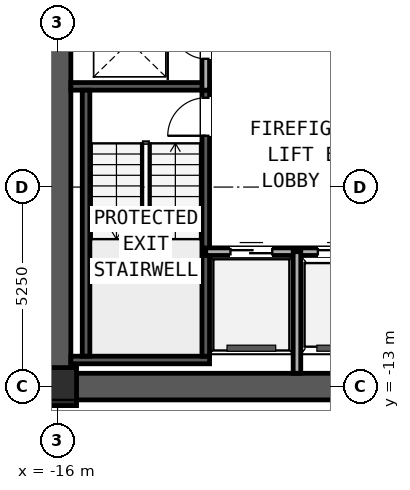
"""IFC4 building model, lengths in metres.
Left out: names, types, materials, properties, quantities, classifications, styles, units other than length and angle.
Written with IfcOpenShell. Run it as: python <this file> out.ifc"""

import sys

from ifc_helpers import new_model, si_unit, direction, frame, frame_2d, origin, origin_2d, place, context, subcontext, project, spatial, rectangle, extrude, element, fill, save


model = new_model("IFC4")
c1 = context("Model", 3, precision=1e-05, world=origin(), true_north=direction((0.0, 1.0)))
c2 = subcontext(c1, "Body", "Model", "MODEL_VIEW")
j1 = project(units=[si_unit("LENGTHUNIT", "METRE"), si_unit("PLANEANGLEUNIT", "RADIAN")], contexts=[c1])
p1 = place(None, origin())
s1 = spatial("IfcSite", under=j1, at=p1, CompositionType="ELEMENT")
p2 = place(p1, origin())
s2 = spatial("IfcBuilding", under=s1, at=p2, CompositionType="ELEMENT")
p3 = place(p2, frame((0.0, 0.0, 142.8)))
s3 = spatial("IfcBuildingStorey", under=s2, at=p3, CompositionType="ELEMENT", Elevation=142.8)
p4 = place(p3, frame((-16.35, -13.0, 0.0), z_axis=(0.0, 0.0, 1.0), x_axis=(1.0, 0.0, 0.0)))
e1 = element("IfcWall", 1, at=p4, inside=s3, PredefinedType="SHEAR", context=c2, shape_type="SweptSolid", body=[
    extrude(rectangle(XDim=32.7, YDim=0.7, at=frame_2d((16.35, 0.0))), origin(), (0.0, 0.0, 1.0), 2.91),
])
p5 = place(p3, frame((-16.0, -12.65, 0.0), z_axis=(0.0, 0.0, 1.0), x_axis=(0.0, 1.0, 0.0)))
e2 = element("IfcWall", 2, at=p5, inside=s3, PredefinedType="SHEAR", context=c2, shape_type="SweptSolid", body=[
    extrude(rectangle(XDim=9.8, YDim=0.7, at=frame_2d((4.9, 0.0))), origin(), (0.0, 0.0, 1.0), 2.91),
])
for number, where, z_axis, x_axis in (
    (3, (-15.65, -12.3, 0.0), (0.0, 0.0, 1.0), (1.0, 0.0, 0.0)),
    (4, (-15.65, -5.1, 0.0), (0.0, 0.0, 1.0), (1.0, 0.0, 0.0)),
):
    element("IfcWall", number, at=place(p3, frame(where, z_axis=z_axis, x_axis=x_axis)), inside=s3, PredefinedType="SOLIDWALL", context=c2, shape_type="SweptSolid", body=[
        extrude(rectangle(XDim=3.65, YDim=0.2, at=frame_2d((1.825, 0.0))), origin(), (0.0, 0.0, 1.0), 3.19),
    ])
p6 = place(p3, frame((-15.25, -12.2, 0.0), z_axis=(0.0, 0.0, 1.0), x_axis=(0.0, 1.0, 0.0)))
e5 = element("IfcWall", 5, at=p6, inside=s3, PredefinedType="SOLIDWALL", context=c2, shape_type="SweptSolid", body=[
    extrude(rectangle(XDim=7.0, YDim=0.2, at=frame_2d((3.5, 0.0))), origin(), (0.0, 0.0, 1.0), 3.19),
])
p7 = place(p3, frame((-12.1, -12.2, 0.0), z_axis=(0.0, 0.0, 1.0), x_axis=(0.0, 1.0, 0.0)))
e6 = element("IfcWall", 6, at=p7, inside=s3, PredefinedType="SOLIDWALL", context=c2, shape_type="SweptSolid", body=[
    extrude(rectangle(XDim=7.0, YDim=0.2, at=frame_2d((3.5, 0.0))), origin(), (0.0, 0.0, 1.0), 3.19),
])
p8 = place(p7, frame((5.8, 0.0, 0.0)))
e7 = element("IfcOpeningElement", 7, at=p8, cuts=e6, PredefinedType="OPENING", context=c2, shape_type="SweptSolid", body=[
    extrude(rectangle(XDim=1.0, YDim=2.1, at=frame_2d((0.5, 1.05))), frame((0.0, 0.11, 0.0), z_axis=(0.0, -1.0, 0.0), x_axis=(1.0, 0.0, 0.0)), (0.0, 0.0, 1.0), 0.22),
])
p9 = place(p3, frame((-16.0, -13.0, 0.0), z_axis=(0.0, 0.0, 1.0), x_axis=(1.0, 0.0, 0.0)))
e8 = element("IfcColumn", 8, at=p9, inside=s3, PredefinedType="COLUMN", context=c2, shape_type="SweptSolid", body=[
    extrude(rectangle(XDim=1.0, YDim=1.0, at=origin_2d()), origin(), (0.0, 0.0, 1.0), 3.45),
])
p10 = place(p3, frame((-26.695, -13.016, 0.0), z_axis=(0.0, 0.0, 1.0), x_axis=(0.995396268366, -0.095845025554, 0.0)))
e9 = element("IfcWall", 9, at=p10, inside=s3, PredefinedType="STANDARD", context=c2, shape_type="SweptSolid", body=[
    extrude(rectangle(XDim=49.6, YDim=0.24, at=frame_2d((24.8, 0.0))), origin(), (0.0, 0.0, 1.0), 3.19),
])
p11 = place(p10, frame((6.044, 0.0, 0.7)))
e10 = element("IfcOpeningElement", 10, at=p11, cuts=e9, PredefinedType="OPENING", context=c2, shape_type="SweptSolid", body=[
    extrude(rectangle(XDim=1.8, YDim=1.5, at=frame_2d((0.9, 0.75))), frame((0.0, 0.13, 0.0), z_axis=(0.0, -1.0, 0.0), x_axis=(1.0, 0.0, 0.0)), (0.0, 0.0, 1.0), 0.26),
])
p12 = place(p10, frame((41.756, 0.0, 0.7)))
e11 = element("IfcOpeningElement", 11, at=p12, cuts=e9, PredefinedType="OPENING", context=c2, shape_type="SweptSolid", body=[
    extrude(rectangle(XDim=1.8, YDim=1.5, at=frame_2d((0.9, 0.75))), frame((0.0, 0.13, 0.0), z_axis=(0.0, -1.0, 0.0), x_axis=(1.0, 0.0, 0.0)), (0.0, 0.0, 1.0), 0.26),
])
p13 = place(p3, frame((-12.1, -5.2, 0.0), z_axis=(0.0, 0.0, 1.0), x_axis=(0.0, 1.0, 0.0)))
e12 = element("IfcWall", 12, at=p13, inside=s3, PredefinedType="PARTITIONING", context=c2, shape_type="SweptSolid", body=[
    extrude(rectangle(XDim=2.35, YDim=0.2, at=frame_2d((1.175, 0.0))), origin(), (0.0, 0.0, 1.0), 2.225),
])
p14 = place(p13, frame((0.825, 0.0, 0.0)))
e13 = element("IfcOpeningElement", 13, at=p14, cuts=e12, PredefinedType="OPENING", context=c2, shape_type="SweptSolid", body=[
    extrude(rectangle(XDim=0.85, YDim=2.05, at=frame_2d((0.425, 1.025))), frame((0.0, 0.11, 0.0), z_axis=(0.0, -1.0, 0.0), x_axis=(1.0, 0.0, 0.0)), (0.0, 0.0, 1.0), 0.22),
])
p15 = place(p3, frame((-12.1, -9.45, 0.0), z_axis=(0.0, 0.0, 1.0), x_axis=(1.0, 0.0, 0.0)))
e14 = element("IfcWall", 14, at=p15, inside=s3, PredefinedType="PARTITIONING", context=c2, shape_type="SweptSolid", body=[
    extrude(rectangle(XDim=4.7, YDim=0.2, at=frame_2d((2.35, 0.0))), origin(), (0.0, 0.0, 1.0), 3.19),
])
p16 = place(p15, frame((0.65, 0.0, 0.0)))
e15 = element("IfcOpeningElement", 15, at=p16, cuts=e14, PredefinedType="OPENING", context=c2, shape_type="SweptSolid", body=[
    extrude(rectangle(XDim=1.1, YDim=2.2, at=frame_2d((0.55, 1.1))), frame((0.0, 0.11, 0.0), z_axis=(0.0, -1.0, 0.0), x_axis=(1.0, 0.0, 0.0)), (0.0, 0.0, 1.0), 0.22),
])
p17 = place(p15, frame((2.95, 0.0, 0.0)))
e16 = element("IfcOpeningElement", 16, at=p17, cuts=e14, PredefinedType="OPENING", context=c2, shape_type="SweptSolid", body=[
    extrude(rectangle(XDim=1.1, YDim=2.2, at=frame_2d((0.55, 1.1))), frame((0.0, 0.11, 0.0), z_axis=(0.0, -1.0, 0.0), x_axis=(1.0, 0.0, 0.0)), (0.0, 0.0, 1.0), 0.22),
])
p18 = place(p3, frame((-9.7, -12.65, 0.0), z_axis=(0.0, 0.0, 1.0), x_axis=(0.0, 1.0, 0.0)))
e17 = element("IfcWall", 17, at=p18, inside=s3, PredefinedType="PARTITIONING", context=c2, shape_type="SweptSolid", body=[
    extrude(rectangle(XDim=3.2, YDim=0.2, at=frame_2d((1.6, 0.0))), origin(), (0.0, 0.0, 1.0), 2.225),
])
p19 = place(p8, frame((1.0, 0.0, 0.0), z_axis=(0.0, 0.0, 1.0), x_axis=(-1.0, 0.0, 0.0)))
e18 = element("IfcDoor", 18, at=p19, inside=s3, OperationType="SINGLE_SWING_LEFT", PredefinedType="DOOR", context=c2, shape_type="SweptSolid", body=[
    extrude(rectangle(XDim=1.0, YDim=2.1, at=frame_2d((0.5, 1.05))), frame((0.0, 0.025, 0.0), z_axis=(0.0, -1.0, 0.0), x_axis=(1.0, 0.0, 0.0)), (0.0, 0.0, 1.0), 0.05),
])
fill(e7, e18)
p20 = place(p14, origin())
e19 = element("IfcDoor", 19, at=p20, inside=s3, OperationType="SINGLE_SWING_RIGHT", PredefinedType="DOOR", context=c2, shape_type="SweptSolid", body=[
    extrude(rectangle(XDim=0.85, YDim=2.05, at=frame_2d((0.425, 1.025))), frame((0.0, 0.025, 0.0), z_axis=(0.0, -1.0, 0.0), x_axis=(1.0, 0.0, 0.0)), (0.0, 0.0, 1.0), 0.05),
])
fill(e13, e19)
p21 = place(p16, origin())
e20 = element("IfcDoor", 20, at=p21, inside=s3, OperationType="SLIDING_TO_LEFT", PredefinedType="DOOR", context=c2, shape_type="SweptSolid", body=[
    extrude(rectangle(XDim=1.1, YDim=2.2, at=frame_2d((0.55, 1.1))), frame((0.0, 0.025, 0.0), z_axis=(0.0, -1.0, 0.0), x_axis=(1.0, 0.0, 0.0)), (0.0, 0.0, 1.0), 0.05),
])
fill(e15, e20)
p22 = place(p17, origin())
e21 = element("IfcDoor", 21, at=p22, inside=s3, OperationType="SLIDING_TO_RIGHT", PredefinedType="DOOR", context=c2, shape_type="SweptSolid", body=[
    extrude(rectangle(XDim=1.1, YDim=2.2, at=frame_2d((0.55, 1.1))), frame((0.0, 0.025, 0.0), z_axis=(0.0, -1.0, 0.0), x_axis=(1.0, 0.0, 0.0)), (0.0, 0.0, 1.0), 0.05),
])
fill(e16, e21)
save(model, sys.argv[1])
